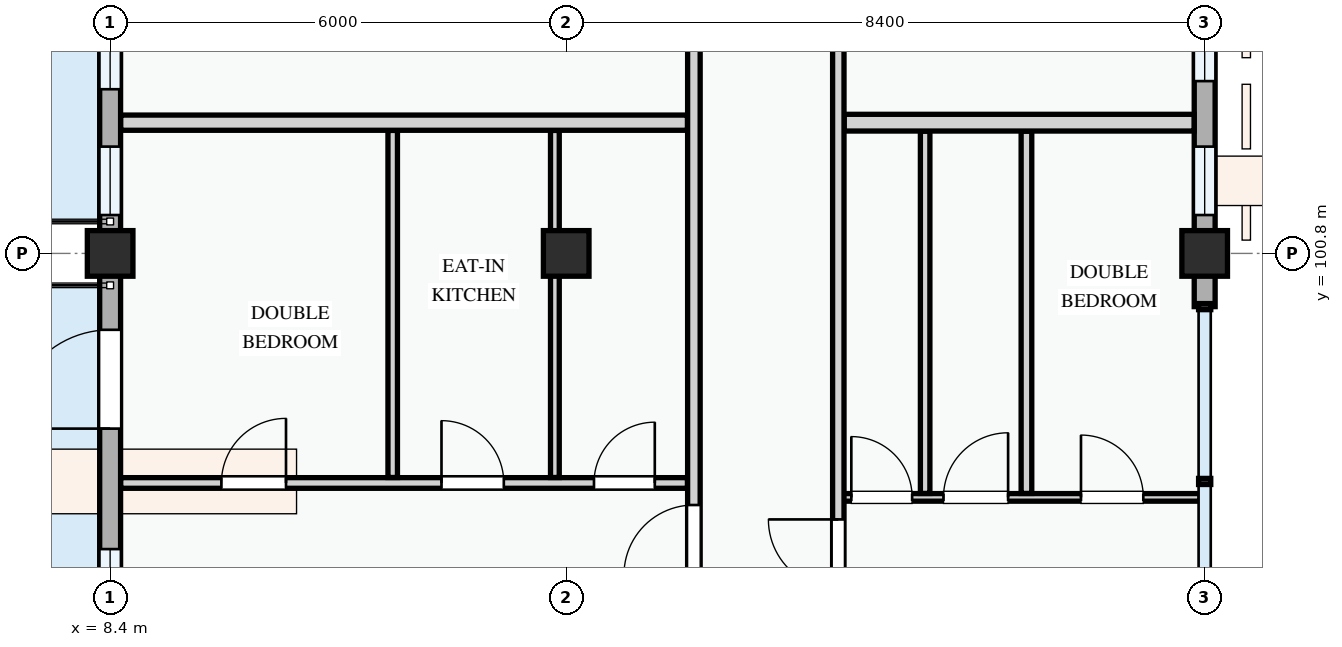
"""IFC4 building model, lengths in metres.
Left out: names, types, materials, properties, quantities, classifications, styles, units other than length and angle.
Written with IfcOpenShell. Run it as: python <this file> out.ifc"""

import sys

from ifc_helpers import new_model, si_unit, direction, frame, frame_2d, origin, origin_2d, place, context, subcontext, project, spatial, rectangle, extrude, element, fill, save


model = new_model("IFC4")
c1 = context("Model", 3, precision=1e-05, world=origin(), true_north=direction((0.0, 1.0)))
c2 = subcontext(c1, "Body", "Model", "MODEL_VIEW")
j1 = project(units=[si_unit("LENGTHUNIT", "METRE"), si_unit("PLANEANGLEUNIT", "RADIAN")], contexts=[c1])
p1 = place(None, origin())
s1 = spatial("IfcSite", under=j1, at=p1, CompositionType="ELEMENT")
p2 = place(p1, origin())
s2 = spatial("IfcBuilding", under=s1, at=p2, CompositionType="ELEMENT")
p3 = place(p2, frame((0.0, 0.0, 31.2)))
s3 = spatial("IfcBuildingStorey", under=s2, at=p3, CompositionType="ELEMENT", Elevation=31.2)
for number, where, z_axis, x_axis in (
    (1, (8.4, 100.8, 0.0), (0.0, 0.0, 1.0), (1.0, 0.0, 0.0)),
    (2, (14.4, 100.8, 0.0), (0.0, 0.0, 1.0), (1.0, 0.0, 0.0)),
    (3, (22.8, 100.8, 0.0), (0.0, 0.0, 1.0), (1.0, 0.0, 0.0)),
):
    element("IfcColumn", number, at=place(p3, frame(where, z_axis=z_axis, x_axis=x_axis)), inside=s3, PredefinedType="COLUMN", context=c2, shape_type="SweptSolid", body=[
        extrude(rectangle(XDim=0.6, YDim=0.6, at=origin_2d()), origin(), (0.0, 0.0, 1.0), 3.3),
    ])
p4 = place(p3, frame((8.4, 109.2, 0.0), z_axis=(0.0, 0.0, 1.0), x_axis=(0.0, -1.0, 0.0)))
e4 = element("IfcWall", 4, at=p4, inside=s3, PredefinedType="STANDARD", context=c2, shape_type="SweptSolid", body=[
    extrude(rectangle(XDim=8.4, YDim=0.275, at=frame_2d((4.2, 0.0))), origin(), (0.0, 0.0, 1.0), 2.425),
])
p5 = place(p4, frame((3.6, 0.0, 0.0)))
e5 = element("IfcOpeningElement", 5, at=p5, cuts=e4, PredefinedType="OPENING", context=c2, shape_type="SweptSolid", body=[
    extrude(rectangle(XDim=1.25, YDim=2.2, at=frame_2d((0.625, 1.1))), frame((0.0, 0.147, 0.0), z_axis=(0.0, -1.0, 0.0), x_axis=(1.0, 0.0, 0.0)), (0.0, 0.0, 1.0), 0.295),
])
p6 = place(p4, frame((0.54, 0.0, 0.78)))
e6 = element("IfcOpeningElement", 6, at=p6, cuts=e4, PredefinedType="OPENING", context=c2, shape_type="SweptSolid", body=[
    extrude(rectangle(XDim=2.38, YDim=1.48, at=frame_2d((1.19, 0.74))), frame((0.0, 0.147, 0.0), z_axis=(0.0, -1.0, 0.0), x_axis=(1.0, 0.0, 0.0)), (0.0, 0.0, 1.0), 0.295),
])
p7 = place(p4, frame((5.34, 0.0, 0.78)))
e7 = element("IfcOpeningElement", 7, at=p7, cuts=e4, PredefinedType="OPENING", context=c2, shape_type="SweptSolid", body=[
    extrude(rectangle(XDim=0.9, YDim=1.2, at=frame_2d((0.45, 0.6))), frame((0.0, 0.147, 0.0), z_axis=(0.0, -1.0, 0.0), x_axis=(1.0, 0.0, 0.0)), (0.0, 0.0, 1.0), 0.295),
])
p8 = place(p4, frame((6.995, 0.0, 0.78)))
e8 = element("IfcOpeningElement", 8, at=p8, cuts=e4, PredefinedType="OPENING", context=c2, shape_type="SweptSolid", body=[
    extrude(rectangle(XDim=0.9, YDim=1.2, at=frame_2d((0.45, 0.6))), frame((0.0, 0.147, 0.0), z_axis=(0.0, -1.0, 0.0), x_axis=(1.0, 0.0, 0.0)), (0.0, 0.0, 1.0), 0.295),
])
p9 = place(p3, frame((8.4, 100.8, 0.0), z_axis=(0.0, 0.0, 1.0), x_axis=(0.0, -1.0, 0.0)))
e9 = element("IfcWall", 9, at=p9, inside=s3, PredefinedType="STANDARD", context=c2, shape_type="SweptSolid", body=[
    extrude(rectangle(XDim=6.0, YDim=0.275, at=frame_2d((3.0, 0.0))), origin(), (0.0, 0.0, 1.0), 2.575),
])
p10 = place(p9, frame((1.005, 0.0, 0.0)))
e10 = element("IfcOpeningElement", 10, at=p10, cuts=e9, PredefinedType="OPENING", context=c2, shape_type="SweptSolid", body=[
    extrude(rectangle(XDim=1.3, YDim=2.15, at=frame_2d((0.65, 1.075))), frame((0.0, 0.147, 0.0), z_axis=(0.0, -1.0, 0.0), x_axis=(1.0, 0.0, 0.0)), (0.0, 0.0, 1.0), 0.295),
])
p11 = place(p9, frame((3.89, 0.0, 0.78)))
e11 = element("IfcOpeningElement", 11, at=p11, cuts=e9, PredefinedType="OPENING", context=c2, shape_type="SweptSolid", body=[
    extrude(rectangle(XDim=1.05, YDim=1.2, at=frame_2d((0.525, 0.6))), frame((0.0, 0.147, 0.0), z_axis=(0.0, -1.0, 0.0), x_axis=(1.0, 0.0, 0.0)), (0.0, 0.0, 1.0), 0.295),
])
p12 = place(p3, frame((22.8, 100.1, 0.0), z_axis=(0.0, 0.0, 1.0), x_axis=(0.0, 1.0, 0.0)))
e12 = element("IfcWall", 12, at=p12, inside=s3, PredefinedType="STANDARD", context=c2, shape_type="SweptSolid", body=[
    extrude(rectangle(XDim=0.7, YDim=0.275, at=frame_2d((0.35, 0.0))), origin(), (0.0, 0.0, 1.0), 2.575),
])
p13 = place(p3, frame((22.8, 100.8, 0.0), z_axis=(0.0, 0.0, 1.0), x_axis=(0.0, 1.0, 0.0)))
e13 = element("IfcWall", 13, at=p13, inside=s3, PredefinedType="STANDARD", context=c2, shape_type="SweptSolid", body=[
    extrude(rectangle(XDim=8.4, YDim=0.275, at=frame_2d((4.2, 0.0))), origin(), (0.0, 0.0, 1.0), 2.425),
])
p14 = place(p13, frame((0.505, 0.0, 0.78)))
e14 = element("IfcOpeningElement", 14, at=p14, cuts=e13, PredefinedType="OPENING", context=c2, shape_type="SweptSolid", body=[
    extrude(rectangle(XDim=0.9, YDim=1.2, at=frame_2d((0.45, 0.6))), frame((0.0, 0.147, 0.0), z_axis=(0.0, -1.0, 0.0), x_axis=(1.0, 0.0, 0.0)), (0.0, 0.0, 1.0), 0.295),
])
p15 = place(p13, frame((2.267, 0.0, 0.78)))
e15 = element("IfcOpeningElement", 15, at=p15, cuts=e13, PredefinedType="OPENING", context=c2, shape_type="SweptSolid", body=[
    extrude(rectangle(XDim=2.18, YDim=1.48, at=frame_2d((1.09, 0.74))), frame((0.0, 0.147, 0.0), z_axis=(0.0, -1.0, 0.0), x_axis=(1.0, 0.0, 0.0)), (0.0, 0.0, 1.0), 0.295),
])
p16 = place(p13, frame((5.392, 0.0, 0.78)))
e16 = element("IfcOpeningElement", 16, at=p16, cuts=e13, PredefinedType="OPENING", context=c2, shape_type="SweptSolid", body=[
    extrude(rectangle(XDim=2.42, YDim=1.52, at=frame_2d((1.21, 0.76))), frame((0.0, 0.147, 0.0), z_axis=(0.0, -1.0, 0.0), x_axis=(1.0, 0.0, 0.0)), (0.0, 0.0, 1.0), 0.295),
])
p17 = place(p3, frame((8.54, 97.78, 0.0), z_axis=(0.0, 0.0, 1.0), x_axis=(1.0, 0.0, 0.0)))
e17 = element("IfcWall", 17, at=p17, inside=s3, PredefinedType="PARTITIONING", context=c2, shape_type="SweptSolid", body=[
    extrude(rectangle(XDim=7.456, YDim=0.14, at=frame_2d((3.728, 0.0))), origin(), (0.0, 0.0, 1.0), 3.0),
])
p18 = place(p17, frame((1.324, 0.0, 0.0)))
e18 = element("IfcOpeningElement", 18, at=p18, cuts=e17, PredefinedType="OPENING", context=c2, shape_type="SweptSolid", body=[
    extrude(rectangle(XDim=0.85, YDim=2.1, at=frame_2d((0.425, 1.05))), frame((0.0, 0.08, 0.0), z_axis=(0.0, -1.0, 0.0), x_axis=(1.0, 0.0, 0.0)), (0.0, 0.0, 1.0), 0.16),
])
p19 = place(p17, frame((4.22, 0.0, 0.0)))
e19 = element("IfcOpeningElement", 19, at=p19, cuts=e17, PredefinedType="OPENING", context=c2, shape_type="SweptSolid", body=[
    extrude(rectangle(XDim=0.82, YDim=2.08, at=frame_2d((0.41, 1.04))), frame((0.0, 0.08, 0.0), z_axis=(0.0, -1.0, 0.0), x_axis=(1.0, 0.0, 0.0)), (0.0, 0.0, 1.0), 0.16),
])
p20 = place(p17, frame((6.226, 0.0, 0.0)))
e20 = element("IfcOpeningElement", 20, at=p20, cuts=e17, PredefinedType="OPENING", context=c2, shape_type="SweptSolid", body=[
    extrude(rectangle(XDim=0.8, YDim=2.1, at=frame_2d((0.4, 1.05))), frame((0.0, 0.08, 0.0), z_axis=(0.0, -1.0, 0.0), x_axis=(1.0, 0.0, 0.0)), (0.0, 0.0, 1.0), 0.16),
])
p21 = place(p3, frame((12.118, 97.852, 0.0), z_axis=(0.0, 0.0, 1.0), x_axis=(0.0, 1.0, 0.0)))
e21 = element("IfcWall", 21, at=p21, inside=s3, PredefinedType="PARTITIONING", context=c2, shape_type="SweptSolid", body=[
    extrude(rectangle(XDim=4.566, YDim=0.125, at=frame_2d((2.283, 0.0))), origin(), (0.0, 0.0, 1.0), 3.0),
])
p22 = place(p3, frame((14.251, 97.852, 0.0), z_axis=(0.0, 0.0, 1.0), x_axis=(0.0, 1.0, 0.0)))
e22 = element("IfcWall", 22, at=p22, inside=s3, PredefinedType="PARTITIONING", context=c2, shape_type="SweptSolid", body=[
    extrude(rectangle(XDim=4.566, YDim=0.115, at=frame_2d((2.283, 0.0))), origin(), (0.0, 0.0, 1.0), 2.425),
])
p23 = place(p3, frame((17.98, 97.59, 0.0), z_axis=(0.0, 0.0, 1.0), x_axis=(1.0, 0.0, 0.0)))
e23 = element("IfcWall", 23, at=p23, inside=s3, PredefinedType="PARTITIONING", context=c2, shape_type="SweptSolid", body=[
    extrude(rectangle(XDim=4.76, YDim=0.1, at=frame_2d((2.38, 0.0))), origin(), (0.0, 0.0, 1.0), 3.0),
])
p24 = place(p23, frame((0.171, 0.0, 0.0)))
e24 = element("IfcOpeningElement", 24, at=p24, cuts=e23, PredefinedType="OPENING", context=c2, shape_type="SweptSolid", body=[
    extrude(rectangle(XDim=0.8, YDim=2.1, at=frame_2d((0.4, 1.05))), frame((0.0, 0.06, 0.0), z_axis=(0.0, -1.0, 0.0), x_axis=(1.0, 0.0, 0.0)), (0.0, 0.0, 1.0), 0.12),
])
p25 = place(p23, frame((1.384, 0.0, 0.0)))
e25 = element("IfcOpeningElement", 25, at=p25, cuts=e23, PredefinedType="OPENING", context=c2, shape_type="SweptSolid", body=[
    extrude(rectangle(XDim=0.85, YDim=2.1, at=frame_2d((0.425, 1.05))), frame((0.0, 0.06, 0.0), z_axis=(0.0, -1.0, 0.0), x_axis=(1.0, 0.0, 0.0)), (0.0, 0.0, 1.0), 0.12),
])
p26 = place(p23, frame((3.193, 0.0, 0.0)))
e26 = element("IfcOpeningElement", 26, at=p26, cuts=e23, PredefinedType="OPENING", context=c2, shape_type="SweptSolid", body=[
    extrude(rectangle(XDim=0.82, YDim=2.08, at=frame_2d((0.41, 1.04))), frame((0.0, 0.06, 0.0), z_axis=(0.0, -1.0, 0.0), x_axis=(1.0, 0.0, 0.0)), (0.0, 0.0, 1.0), 0.12),
])
p27 = place(p3, frame((20.455, 97.642, 0.0), z_axis=(0.0, 0.0, 1.0), x_axis=(0.0, 1.0, 0.0)))
e27 = element("IfcWall", 27, at=p27, inside=s3, PredefinedType="PARTITIONING", context=c2, shape_type="SweptSolid", body=[
    extrude(rectangle(XDim=4.766, YDim=0.14, at=frame_2d((2.383, 0.0))), origin(), (0.0, 0.0, 1.0), 3.0),
])
p28 = place(p3, frame((19.122, 97.642, 0.0), z_axis=(0.0, 0.0, 1.0), x_axis=(0.0, 1.0, 0.0)))
e28 = element("IfcWall", 28, at=p28, inside=s3, PredefinedType="PARTITIONING", context=c2, shape_type="SweptSolid", body=[
    extrude(rectangle(XDim=4.766, YDim=0.125, at=frame_2d((2.383, 0.0))), origin(), (0.0, 0.0, 1.0), 3.0),
])
p29 = place(p3, frame((8.54, 102.52, 0.0), z_axis=(0.0, 0.0, 1.0), x_axis=(1.0, 0.0, 0.0)))
e29 = element("IfcWall", 29, at=p29, inside=s3, PredefinedType="PARTITIONING", context=c2, shape_type="SweptSolid", body=[
    extrude(rectangle(XDim=7.456, YDim=0.2, at=frame_2d((3.728, 0.0))), origin(), (0.0, 0.0, 1.0), 3.0),
])
p30 = place(p3, frame((18.057, 102.52, 0.0), z_axis=(0.0, 0.0, 1.0), x_axis=(1.0, 0.0, 0.0)))
e30 = element("IfcWall", 30, at=p30, inside=s3, PredefinedType="PARTITIONING", context=c2, shape_type="SweptSolid", body=[
    extrude(rectangle(XDim=4.604, YDim=0.22, at=frame_2d((2.302, 0.0))), origin(), (0.0, 0.0, 1.0), 3.0),
])
p31 = place(p3, frame((16.08, 86.46, 0.0), z_axis=(0.0, 0.0, 1.0), x_axis=(0.0, 1.0, 0.0)))
e31 = element("IfcWall", 31, at=p31, inside=s3, PredefinedType="PARTITIONING", context=c2, shape_type="SweptSolid", body=[
    extrude(rectangle(XDim=22.88, YDim=0.165, at=frame_2d((11.44, 0.0))), origin(), (0.0, 0.0, 1.0), 3.0),
])
p32 = place(p31, frame((2.08, 0.0, 0.0)))
e32 = element("IfcOpeningElement", 32, at=p32, cuts=e31, PredefinedType="OPENING", context=c2, shape_type="SweptSolid", body=[
    extrude(rectangle(XDim=0.92, YDim=2.1, at=frame_2d((0.46, 1.05))), frame((0.0, 0.093, 0.0), z_axis=(0.0, -1.0, 0.0), x_axis=(1.0, 0.0, 0.0)), (0.0, 0.0, 1.0), 0.185),
])
p33 = place(p31, frame((10.11, 0.0, 0.0)))
e33 = element("IfcOpeningElement", 33, at=p33, cuts=e31, PredefinedType="OPENING", context=c2, shape_type="SweptSolid", body=[
    extrude(rectangle(XDim=0.92, YDim=2.1, at=frame_2d((0.46, 1.05))), frame((0.0, 0.093, 0.0), z_axis=(0.0, -1.0, 0.0), x_axis=(1.0, 0.0, 0.0)), (0.0, 0.0, 1.0), 0.185),
])
p34 = place(p31, frame((18.077, 0.0, 0.0)))
e34 = element("IfcOpeningElement", 34, at=p34, cuts=e31, PredefinedType="OPENING", context=c2, shape_type="SweptSolid", body=[
    extrude(rectangle(XDim=0.92, YDim=2.1, at=frame_2d((0.46, 1.05))), frame((0.0, 0.093, 0.0), z_axis=(0.0, -1.0, 0.0), x_axis=(1.0, 0.0, 0.0)), (0.0, 0.0, 1.0), 0.185),
])
p35 = place(p3, frame((17.98, 86.46, 0.0), z_axis=(0.0, 0.0, 1.0), x_axis=(0.0, 1.0, 0.0)))
e35 = element("IfcWall", 35, at=p35, inside=s3, PredefinedType="PARTITIONING", context=c2, shape_type="SweptSolid", body=[
    extrude(rectangle(XDim=22.88, YDim=0.15, at=frame_2d((11.44, 0.0))), origin(), (0.0, 0.0, 1.0), 3.0),
])
p36 = place(p35, frame((1.948, 0.0, 0.0)))
e36 = element("IfcOpeningElement", 36, at=p36, cuts=e35, PredefinedType="OPENING", context=c2, shape_type="SweptSolid", body=[
    extrude(rectangle(XDim=0.96, YDim=2.12, at=frame_2d((0.48, 1.06))), frame((0.0, 0.085, 0.0), z_axis=(0.0, -1.0, 0.0), x_axis=(1.0, 0.0, 0.0)), (0.0, 0.0, 1.0), 0.17),
])
p37 = place(p35, frame((9.92, 0.0, 0.0)))
e37 = element("IfcOpeningElement", 37, at=p37, cuts=e35, PredefinedType="OPENING", context=c2, shape_type="SweptSolid", body=[
    extrude(rectangle(XDim=0.92, YDim=2.1, at=frame_2d((0.46, 1.05))), frame((0.0, 0.085, 0.0), z_axis=(0.0, -1.0, 0.0), x_axis=(1.0, 0.0, 0.0)), (0.0, 0.0, 1.0), 0.17),
])
p38 = place(p35, frame((18.067, 0.0, 0.0)))
e38 = element("IfcOpeningElement", 38, at=p38, cuts=e35, PredefinedType="OPENING", context=c2, shape_type="SweptSolid", body=[
    extrude(rectangle(XDim=0.92, YDim=2.1, at=frame_2d((0.46, 1.05))), frame((0.0, 0.085, 0.0), z_axis=(0.0, -1.0, 0.0), x_axis=(1.0, 0.0, 0.0)), (0.0, 0.0, 1.0), 0.17),
])
p39 = place(p7, origin())
e39 = element("IfcWindow", 39, at=p39, inside=s3, PartitioningType="SINGLE_PANEL", PredefinedType="WINDOW", context=c2, shape_type="SweptSolid", body=[
    extrude(rectangle(XDim=0.9, YDim=1.2, at=frame_2d((0.45, 0.6))), frame((0.0, 0.03, 0.0), z_axis=(0.0, -1.0, 0.0), x_axis=(1.0, 0.0, 0.0)), (0.0, 0.0, 1.0), 0.06),
])
fill(e7, e39)
p40 = place(p8, origin())
e40 = element("IfcWindow", 40, at=p40, inside=s3, PartitioningType="SINGLE_PANEL", PredefinedType="WINDOW", context=c2, shape_type="SweptSolid", body=[
    extrude(rectangle(XDim=0.9, YDim=1.2, at=frame_2d((0.45, 0.6))), frame((0.0, 0.03, 0.0), z_axis=(0.0, -1.0, 0.0), x_axis=(1.0, 0.0, 0.0)), (0.0, 0.0, 1.0), 0.06),
])
fill(e8, e40)
p41 = place(p10, frame((1.3, 0.0, 0.0), z_axis=(0.0, 0.0, 1.0), x_axis=(-1.0, 0.0, 0.0)))
e41 = element("IfcDoor", 41, at=p41, inside=s3, OperationType="SINGLE_SWING_LEFT", PredefinedType="DOOR", context=c2, shape_type="SweptSolid", body=[
    extrude(rectangle(XDim=1.3, YDim=2.15, at=frame_2d((0.65, 1.075))), frame((0.0, 0.025, 0.0), z_axis=(0.0, -1.0, 0.0), x_axis=(1.0, 0.0, 0.0)), (0.0, 0.0, 1.0), 0.05),
])
fill(e10, e41)
p42 = place(p11, origin())
e42 = element("IfcWindow", 42, at=p42, inside=s3, PartitioningType="SINGLE_PANEL", PredefinedType="WINDOW", context=c2, shape_type="SweptSolid", body=[
    extrude(rectangle(XDim=1.05, YDim=1.2, at=frame_2d((0.525, 0.6))), frame((0.0, 0.03, 0.0), z_axis=(0.0, -1.0, 0.0), x_axis=(1.0, 0.0, 0.0)), (0.0, 0.0, 1.0), 0.06),
])
fill(e11, e42)
p43 = place(p14, origin())
e43 = element("IfcWindow", 43, at=p43, inside=s3, PartitioningType="SINGLE_PANEL", PredefinedType="WINDOW", context=c2, shape_type="SweptSolid", body=[
    extrude(rectangle(XDim=0.9, YDim=1.2, at=frame_2d((0.45, 0.6))), frame((0.0, 0.03, 0.0), z_axis=(0.0, -1.0, 0.0), x_axis=(1.0, 0.0, 0.0)), (0.0, 0.0, 1.0), 0.06),
])
fill(e14, e43)
p44 = place(p15, origin())
e44 = element("IfcWindow", 44, at=p44, inside=s3, PartitioningType="DOUBLE_PANEL_VERTICAL", PredefinedType="WINDOW", context=c2, shape_type="SweptSolid", body=[
    extrude(rectangle(XDim=2.18, YDim=1.48, at=frame_2d((1.09, 0.74))), frame((0.0, 0.03, 0.0), z_axis=(0.0, -1.0, 0.0), x_axis=(1.0, 0.0, 0.0)), (0.0, 0.0, 1.0), 0.06),
])
fill(e15, e44)
p45 = place(p18, origin())
e45 = element("IfcDoor", 45, at=p45, inside=s3, OperationType="SINGLE_SWING_RIGHT", PredefinedType="DOOR", context=c2, shape_type="SweptSolid", body=[
    extrude(rectangle(XDim=0.85, YDim=2.1, at=frame_2d((0.425, 1.05))), frame((0.0, 0.025, 0.0), z_axis=(0.0, -1.0, 0.0), x_axis=(1.0, 0.0, 0.0)), (0.0, 0.0, 1.0), 0.05),
])
fill(e18, e45)
p46 = place(p19, origin())
e46 = element("IfcDoor", 46, at=p46, inside=s3, OperationType="SINGLE_SWING_LEFT", PredefinedType="DOOR", context=c2, shape_type="SweptSolid", body=[
    extrude(rectangle(XDim=0.82, YDim=2.08, at=frame_2d((0.41, 1.04))), frame((0.0, 0.025, 0.0), z_axis=(0.0, -1.0, 0.0), x_axis=(1.0, 0.0, 0.0)), (0.0, 0.0, 1.0), 0.05),
])
fill(e19, e46)
p47 = place(p20, origin())
e47 = element("IfcDoor", 47, at=p47, inside=s3, OperationType="SINGLE_SWING_RIGHT", PredefinedType="DOOR", context=c2, shape_type="SweptSolid", body=[
    extrude(rectangle(XDim=0.8, YDim=2.1, at=frame_2d((0.4, 1.05))), frame((0.0, 0.025, 0.0), z_axis=(0.0, -1.0, 0.0), x_axis=(1.0, 0.0, 0.0)), (0.0, 0.0, 1.0), 0.05),
])
fill(e20, e47)
p48 = place(p24, origin())
e48 = element("IfcDoor", 48, at=p48, inside=s3, OperationType="SINGLE_SWING_LEFT", PredefinedType="DOOR", context=c2, shape_type="SweptSolid", body=[
    extrude(rectangle(XDim=0.8, YDim=2.1, at=frame_2d((0.4, 1.05))), frame((0.0, 0.025, 0.0), z_axis=(0.0, -1.0, 0.0), x_axis=(1.0, 0.0, 0.0)), (0.0, 0.0, 1.0), 0.05),
])
fill(e24, e48)
p49 = place(p25, origin())
e49 = element("IfcDoor", 49, at=p49, inside=s3, OperationType="SINGLE_SWING_RIGHT", PredefinedType="DOOR", context=c2, shape_type="SweptSolid", body=[
    extrude(rectangle(XDim=0.85, YDim=2.1, at=frame_2d((0.425, 1.05))), frame((0.0, 0.025, 0.0), z_axis=(0.0, -1.0, 0.0), x_axis=(1.0, 0.0, 0.0)), (0.0, 0.0, 1.0), 0.05),
])
fill(e25, e49)
p50 = place(p26, origin())
e50 = element("IfcDoor", 50, at=p50, inside=s3, OperationType="SINGLE_SWING_LEFT", PredefinedType="DOOR", context=c2, shape_type="SweptSolid", body=[
    extrude(rectangle(XDim=0.82, YDim=2.08, at=frame_2d((0.41, 1.04))), frame((0.0, 0.025, 0.0), z_axis=(0.0, -1.0, 0.0), x_axis=(1.0, 0.0, 0.0)), (0.0, 0.0, 1.0), 0.05),
])
fill(e26, e50)
p51 = place(p33, origin())
e51 = element("IfcDoor", 51, at=p51, inside=s3, OperationType="SINGLE_SWING_LEFT", PredefinedType="DOOR", context=c2, shape_type="SweptSolid", body=[
    extrude(rectangle(XDim=0.92, YDim=2.1, at=frame_2d((0.46, 1.05))), frame((0.0, 0.025, 0.0), z_axis=(0.0, -1.0, 0.0), x_axis=(1.0, 0.0, 0.0)), (0.0, 0.0, 1.0), 0.05),
])
fill(e33, e51)
p52 = place(p37, origin())
e52 = element("IfcDoor", 52, at=p52, inside=s3, OperationType="SINGLE_SWING_RIGHT", PredefinedType="DOOR", context=c2, shape_type="SweptSolid", body=[
    extrude(rectangle(XDim=0.92, YDim=2.1, at=frame_2d((0.46, 1.05))), frame((0.0, 0.025, 0.0), z_axis=(0.0, -1.0, 0.0), x_axis=(1.0, 0.0, 0.0)), (0.0, 0.0, 1.0), 0.05),
])
fill(e37, e52)
save(model, sys.argv[1])
